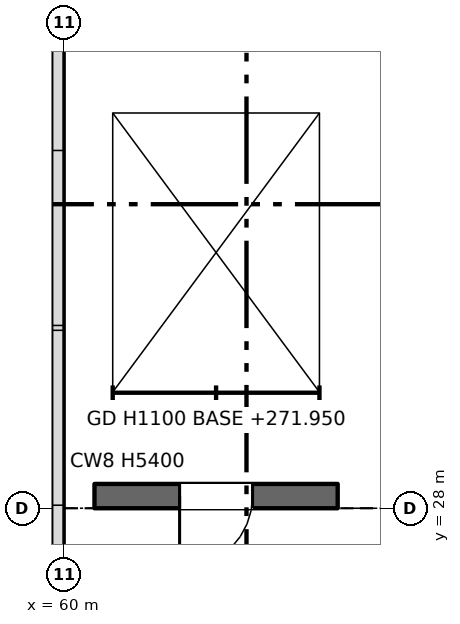
"""IFC4 building model, lengths in metres.
Left out: names, types, materials, properties, quantities, classifications, styles, units other than length and angle.
Written with IfcOpenShell. Run it as: python <this file> out.ifc"""

import sys

from ifc_helpers import new_model, si_unit, direction, frame, frame_2d, origin, place, context, subcontext, project, spatial, rectangle, extrude, element, fill, save


model = new_model("IFC4")
c1 = context("Model", 3, precision=1e-05, world=origin(), true_north=direction((0.0, 1.0)))
c2 = subcontext(c1, "Body", "Model", "MODEL_VIEW")
j1 = project(units=[si_unit("LENGTHUNIT", "METRE"), si_unit("PLANEANGLEUNIT", "RADIAN")], contexts=[c1])
p1 = place(None, origin())
s1 = spatial("IfcSite", under=j1, at=p1, CompositionType="ELEMENT")
p2 = place(p1, origin())
s2 = spatial("IfcBuilding", under=s1, at=p2, CompositionType="ELEMENT")
p3 = place(p2, frame((0.0, 0.0, 271.95)))
s3 = spatial("IfcBuildingStorey", under=s2, at=p3, CompositionType="ELEMENT", Elevation=271.95)
p4 = place(p3, frame((59.85, 6.3, 6.0), z_axis=(0.0, 0.0, 1.0), x_axis=(0.0, 1.0, 0.0)))
e1 = element("IfcWall", 1, at=p4, inside=s3, PredefinedType="PARAPET", context=c2, shape_type="SweptSolid", body=[
    extrude(rectangle(XDim=30.4, YDim=0.3, at=frame_2d((15.2, 0.0))), origin(), (0.0, 0.0, 1.0), 1.1),
])
for number, where, z_axis, x_axis in (
    (2, (60.65, 28.4, 0.0), (0.0, 0.0, 1.0), (0.0, 1.0, 0.0)),
    (3, (64.35, 28.4, 0.0), (0.0, 0.0, 1.0), (0.0, 1.0, 0.0)),
):
    element("IfcWall", number, at=place(p3, frame(where, z_axis=z_axis, x_axis=x_axis)), inside=s3, PredefinedType="SHEAR", context=c2, shape_type="SweptSolid", body=[
        extrude(rectangle(XDim=6.1, YDim=0.3, at=frame_2d((3.05, 0.0))), origin(), (0.0, 0.0, 1.0), 5.2),
    ])
p5 = place(p3, frame((60.5, 28.2, 0.0), z_axis=(0.0, 0.0, 1.0), x_axis=(1.0, 0.0, 0.0)))
e4 = element("IfcWall", 4, at=p5, inside=s3, PredefinedType="SHEAR", context=c2, shape_type="SweptSolid", body=[
    extrude(rectangle(XDim=4.0, YDim=0.4, at=frame_2d((2.0, 0.0))), origin(), (0.0, 0.0, 1.0), 5.2),
])
p6 = place(p5, frame((1.4, 0.0, 0.0)))
e5 = element("IfcOpeningElement", 5, at=p6, cuts=e4, PredefinedType="OPENING", context=c2, shape_type="SweptSolid", body=[
    extrude(rectangle(XDim=1.2, YDim=2.1, at=frame_2d((0.6, 1.05))), frame((0.0, 0.21, 0.0), z_axis=(0.0, -1.0, 0.0), x_axis=(1.0, 0.0, 0.0)), (0.0, 0.0, 1.0), 0.42),
])
p7 = place(p3, frame((60.5, 34.65, 0.0), z_axis=(0.0, 0.0, 1.0), x_axis=(1.0, 0.0, 0.0)))
e6 = element("IfcWall", 6, at=p7, inside=s3, PredefinedType="SHEAR", context=c2, shape_type="SweptSolid", body=[
    extrude(rectangle(XDim=4.0, YDim=0.3, at=frame_2d((2.0, 0.0))), origin(), (0.0, 0.0, 1.0), 5.2),
])
p8 = place(p6, frame((1.2, 0.0, 0.0), z_axis=(0.0, 0.0, 1.0), x_axis=(-1.0, 0.0, 0.0)))
e7 = element("IfcDoor", 7, at=p8, inside=s3, OperationType="SINGLE_SWING_RIGHT", PredefinedType="DOOR", context=c2, shape_type="SweptSolid", body=[
    extrude(rectangle(XDim=1.2, YDim=2.1, at=frame_2d((0.6, 1.05))), frame((0.0, 0.025, 0.0), z_axis=(0.0, -1.0, 0.0), x_axis=(1.0, 0.0, 0.0)), (0.0, 0.0, 1.0), 0.05),
])
fill(e5, e7)
save(model, sys.argv[1])
